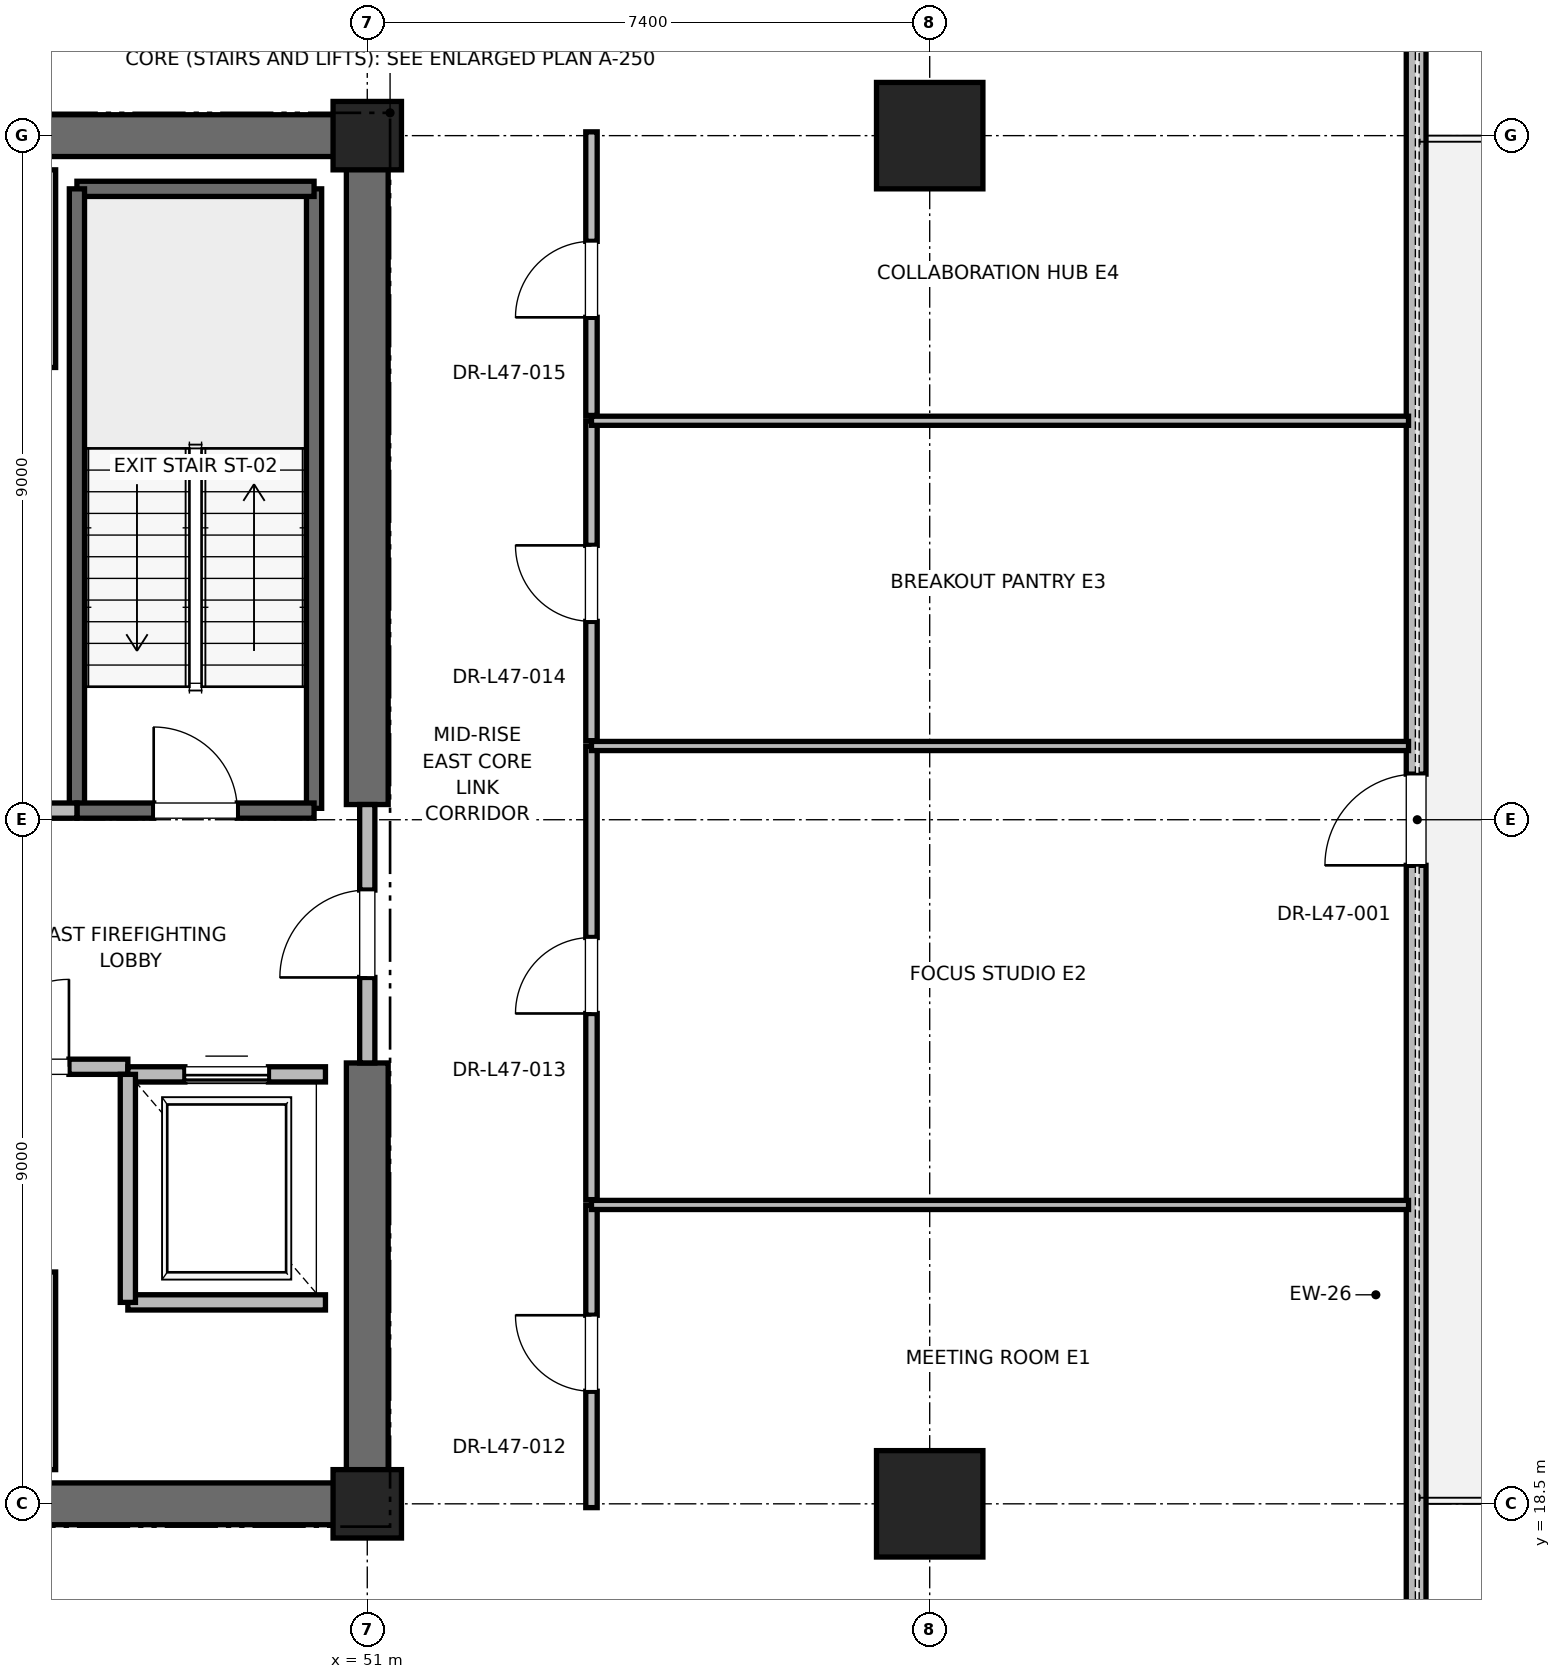
"""IFC4 building model, lengths in metres.
Left out: names, types, materials, properties, quantities, classifications, styles, units other than length and angle.
Written with IfcOpenShell. Run it as: python <this file> out.ifc"""

import sys

from ifc_helpers import new_model, si_unit, direction, frame, frame_2d, origin, origin_2d, place, context, subcontext, project, spatial, rectangle, extrude, element, fill, save


model = new_model("IFC4")
c1 = context("Model", 3, precision=1e-05, world=origin(), true_north=direction((0.0, 1.0)))
c2 = subcontext(c1, "Body", "Model", "MODEL_VIEW")
j1 = project(units=[si_unit("LENGTHUNIT", "METRE"), si_unit("PLANEANGLEUNIT", "RADIAN")], contexts=[c1])
p1 = place(None, origin())
s1 = spatial("IfcSite", under=j1, at=p1, CompositionType="ELEMENT")
p2 = place(p1, origin())
s2 = spatial("IfcBuilding", under=s1, at=p2, CompositionType="ELEMENT")
p3 = place(p2, frame((0.0, 0.0, 205.2)))
s3 = spatial("IfcBuildingStorey", under=s2, at=p3, CompositionType="ELEMENT", Elevation=205.2)
for number, where, z_axis, x_axis in (
    (1, (58.4, 18.5, 0.0), (0.0, 0.0, 1.0), (1.0, 0.0, 0.0)),
    (2, (58.4, 36.5, 0.0), (0.0, 0.0, 1.0), (1.0, 0.0, 0.0)),
):
    element("IfcColumn", number, at=place(p3, frame(where, z_axis=z_axis, x_axis=x_axis)), inside=s3, PredefinedType="COLUMN", context=c2, shape_type="SweptSolid", body=[
        extrude(rectangle(XDim=1.4, YDim=1.4, at=origin_2d()), origin(), (0.0, 0.0, 1.0), 4.0),
    ])
for number, where, z_axis, x_axis in (
    (3, (51.0, 18.5, 0.0), (0.0, 0.0, 1.0), (1.0, 0.0, 0.0)),
    (4, (51.0, 36.5, 0.0), (0.0, 0.0, 1.0), (1.0, 0.0, 0.0)),
):
    element("IfcColumn", number, at=place(p3, frame(where, z_axis=z_axis, x_axis=x_axis)), inside=s3, PredefinedType="PILASTER", context=c2, shape_type="SweptSolid", body=[
        extrude(rectangle(XDim=0.9, YDim=0.9, at=origin_2d()), origin(), (0.0, 0.0, 1.0), 4.0),
    ])
p4 = place(p3, frame((41.8, 18.5, 0.0), z_axis=(0.0, 0.0, 1.0), x_axis=(1.0, 0.0, 0.0)))
e5 = element("IfcWall", 5, at=p4, inside=s3, PredefinedType="SHEAR", context=c2, shape_type="SweptSolid", body=[
    extrude(rectangle(XDim=9.2, YDim=0.55, at=frame_2d((4.6, 0.0))), origin(), (0.0, 0.0, 1.0), 3.775),
])
for number, where, z_axis, x_axis in (
    (6, (45.2, 36.5, 0.0), (0.0, 0.0, 1.0), (1.0, 0.0, 0.0)),
    (7, (51.0, 18.5, 0.0), (0.0, 0.0, 1.0), (0.0, 1.0, 0.0)),
):
    element("IfcWall", number, at=place(p3, frame(where, z_axis=z_axis, x_axis=x_axis)), inside=s3, PredefinedType="SHEAR", context=c2, shape_type="SweptSolid", body=[
        extrude(rectangle(XDim=5.8, YDim=0.55, at=frame_2d((2.9, 0.0))), origin(), (0.0, 0.0, 1.0), 3.775),
    ])
p5 = place(p3, frame((51.0, 27.7, 0.0), z_axis=(0.0, 0.0, 1.0), x_axis=(0.0, 1.0, 0.0)))
e8 = element("IfcWall", 8, at=p5, inside=s3, PredefinedType="SHEAR", context=c2, shape_type="SweptSolid", body=[
    extrude(rectangle(XDim=8.8, YDim=0.55, at=frame_2d((4.4, 0.0))), origin(), (0.0, 0.0, 1.0), 3.775),
])
p6 = place(p3, frame((64.8, 9.4, 0.0), z_axis=(0.0, 0.0, 1.0), x_axis=(0.0, 1.0, 0.0)))
e9 = element("IfcWall", 9, at=p6, inside=s3, PredefinedType="PARAPET", context=c2, shape_type="SweptSolid", body=[
    extrude(rectangle(XDim=36.2, YDim=0.26, at=frame_2d((18.1, 0.0))), origin(), (0.0, 0.0, 1.0), 3.047),
])
p7 = place(p6, frame((4.2, 0.0, 0.85)))
e10 = element("IfcOpeningElement", 10, at=p7, cuts=e9, PredefinedType="OPENING", context=c2, shape_type="SweptSolid", body=[
    extrude(rectangle(XDim=2.0, YDim=2.3, at=frame_2d((1.0, 1.15))), frame((0.0, 0.13, 0.0), z_axis=(0.0, -1.0, 0.0), x_axis=(1.0, 0.0, 0.0)), (0.0, 0.0, 1.0), 0.26),
])
p8 = place(p6, frame((17.5, 0.0, 0.0)))
e11 = element("IfcOpeningElement", 11, at=p8, cuts=e9, PredefinedType="OPENING", context=c2, shape_type="SweptSolid", body=[
    extrude(rectangle(XDim=1.2, YDim=2.2, at=frame_2d((0.6, 1.1))), frame((0.0, 0.13, 0.0), z_axis=(0.0, -1.0, 0.0), x_axis=(1.0, 0.0, 0.0)), (0.0, 0.0, 1.0), 0.26),
])
p9 = place(p6, frame((30.0, 0.0, 0.85)))
e12 = element("IfcOpeningElement", 12, at=p9, cuts=e9, PredefinedType="OPENING", context=c2, shape_type="SweptSolid", body=[
    extrude(rectangle(XDim=2.0, YDim=2.3, at=frame_2d((1.0, 1.15))), frame((0.0, 0.13, 0.0), z_axis=(0.0, -1.0, 0.0), x_axis=(1.0, 0.0, 0.0)), (0.0, 0.0, 1.0), 0.26),
])
p10 = place(p3, frame((50.3, 27.65, 0.0), z_axis=(0.0, 0.0, 1.0), x_axis=(0.0, 1.0, 0.0)))
e13 = element("IfcWall", 13, at=p10, inside=s3, PredefinedType="SOLIDWALL", context=c2, shape_type="SweptSolid", body=[
    extrude(rectangle(XDim=8.15, YDim=0.2, at=frame_2d((4.075, 0.0))), origin(), (0.0, 0.0, 1.0), 3.775),
])
p11 = place(p3, frame((47.18, 35.8, 0.0), z_axis=(0.0, 0.0, 1.0), x_axis=(1.0, 0.0, 0.0)))
e14 = element("IfcWall", 14, at=p11, inside=s3, PredefinedType="SOLIDWALL", context=c2, shape_type="SweptSolid", body=[
    extrude(rectangle(XDim=3.12, YDim=0.2, at=frame_2d((1.56, 0.0))), origin(), (0.0, 0.0, 1.0), 3.775),
])
p12 = place(p3, frame((47.18, 27.62, 0.0), z_axis=(0.0, 0.0, 1.0), x_axis=(0.0, 1.0, 0.0)))
e15 = element("IfcWall", 15, at=p12, inside=s3, PredefinedType="SOLIDWALL", context=c2, shape_type="SweptSolid", body=[
    extrude(rectangle(XDim=8.18, YDim=0.2, at=frame_2d((4.09, 0.0))), origin(), (0.0, 0.0, 1.0), 3.775),
])
p13 = place(p3, frame((47.18, 27.62, 0.0), z_axis=(0.0, 0.0, 1.0), x_axis=(1.0, 0.0, 0.0)))
e16 = element("IfcWall", 16, at=p13, inside=s3, PredefinedType="SOLIDWALL", context=c2, shape_type="SweptSolid", body=[
    extrude(rectangle(XDim=3.12, YDim=0.2, at=frame_2d((1.56, 0.0))), origin(), (0.0, 0.0, 1.0), 3.775),
])
p14 = place(p13, frame((1.01, 0.0, 0.0)))
e17 = element("IfcOpeningElement", 17, at=p14, cuts=e16, PredefinedType="OPENING", context=c2, shape_type="SweptSolid", body=[
    extrude(rectangle(XDim=1.1, YDim=2.15, at=frame_2d((0.55, 1.075))), frame((0.0, 0.1, 0.0), z_axis=(0.0, -1.0, 0.0), x_axis=(1.0, 0.0, 0.0)), (0.0, 0.0, 1.0), 0.2),
])
p15 = place(p3, frame((45.15, 24.25, 0.0), z_axis=(0.0, 0.0, 1.0), x_axis=(1.0, 0.0, 0.0)))
e18 = element("IfcWall", 18, at=p15, inside=s3, PredefinedType="PARTITIONING", context=c2, shape_type="SweptSolid", body=[
    extrude(rectangle(XDim=2.7, YDim=0.2, at=frame_2d((1.35, 0.0))), origin(), (0.0, 0.0, 1.0), 3.775),
])
p16 = place(p15, frame((0.775, 0.0, 0.0)))
e19 = element("IfcOpeningElement", 19, at=p16, cuts=e18, PredefinedType="OPENING", context=c2, shape_type="SweptSolid", body=[
    extrude(rectangle(XDim=1.15, YDim=2.2, at=frame_2d((0.575, 1.1))), frame((0.0, 0.1, 0.0), z_axis=(0.0, -1.0, 0.0), x_axis=(1.0, 0.0, 0.0)), (0.0, 0.0, 1.0), 0.2),
])
p17 = place(p3, frame((45.15, 27.62, 0.0), z_axis=(0.0, 0.0, 1.0), x_axis=(1.0, 0.0, 0.0)))
e20 = element("IfcWall", 20, at=p17, inside=s3, PredefinedType="PARTITIONING", context=c2, shape_type="SweptSolid", body=[
    extrude(rectangle(XDim=2.03, YDim=0.2, at=frame_2d((1.015, 0.0))), origin(), (0.0, 0.0, 1.0), 3.775),
])
p18 = place(p17, frame((0.44, 0.0, 0.0)))
e21 = element("IfcOpeningElement", 21, at=p18, cuts=e20, PredefinedType="OPENING", context=c2, shape_type="SweptSolid", body=[
    extrude(rectangle(XDim=1.15, YDim=2.2, at=frame_2d((0.575, 1.1))), frame((0.0, 0.1, 0.0), z_axis=(0.0, -1.0, 0.0), x_axis=(1.0, 0.0, 0.0)), (0.0, 0.0, 1.0), 0.2),
])
p19 = place(p3, frame((51.0, 24.3, 0.0), z_axis=(0.0, 0.0, 1.0), x_axis=(0.0, 1.0, 0.0)))
e22 = element("IfcWall", 22, at=p19, inside=s3, PredefinedType="PARTITIONING", context=c2, shape_type="SweptSolid", body=[
    extrude(rectangle(XDim=3.4, YDim=0.2, at=frame_2d((1.7, 0.0))), origin(), (0.0, 0.0, 1.0), 2.755),
])
p20 = place(p19, frame((1.125, 0.0, 0.0)))
e23 = element("IfcOpeningElement", 23, at=p20, cuts=e22, PredefinedType="OPENING", context=c2, shape_type="SweptSolid", body=[
    extrude(rectangle(XDim=1.15, YDim=2.2, at=frame_2d((0.575, 1.1))), frame((0.0, 0.1, 0.0), z_axis=(0.0, -1.0, 0.0), x_axis=(1.0, 0.0, 0.0)), (0.0, 0.0, 1.0), 0.2),
])
p21 = place(p3, frame((47.85, 21.15, 0.0), z_axis=(0.0, 0.0, 1.0), x_axis=(1.0, 0.0, 0.0)))
e24 = element("IfcWall", 24, at=p21, inside=s3, PredefinedType="SOLIDWALL", context=c2, shape_type="SweptSolid", body=[
    extrude(rectangle(XDim=2.6, YDim=0.2, at=frame_2d((1.3, 0.0))), origin(), (0.0, 0.0, 1.0), 3.775),
])
p22 = place(p3, frame((50.45, 24.15, 0.0), z_axis=(0.0, 0.0, 1.0), x_axis=(-1.0, 0.0, 0.0)))
e25 = element("IfcWall", 25, at=p22, inside=s3, PredefinedType="SOLIDWALL", context=c2, shape_type="SweptSolid", body=[
    extrude(rectangle(XDim=2.6, YDim=0.2, at=frame_2d((1.3, 0.0))), origin(), (0.0, 0.0, 1.0), 2.755),
])
p23 = place(p22, frame((0.75, 0.0, 0.0)))
e26 = element("IfcOpeningElement", 26, at=p23, cuts=e25, PredefinedType="OPENING", context=c2, shape_type="SweptSolid", body=[
    extrude(rectangle(XDim=1.1, YDim=2.2, at=frame_2d((0.55, 1.1))), frame((0.0, 0.1, 0.0), z_axis=(0.0, -1.0, 0.0), x_axis=(1.0, 0.0, 0.0)), (0.0, 0.0, 1.0), 0.2),
])
p24 = place(p3, frame((47.85, 24.15, 0.0), z_axis=(0.0, 0.0, 1.0), x_axis=(0.0, -1.0, 0.0)))
e27 = element("IfcWall", 27, at=p24, inside=s3, PredefinedType="SOLIDWALL", context=c2, shape_type="SweptSolid", body=[
    extrude(rectangle(XDim=3.0, YDim=0.2, at=frame_2d((1.5, 0.0))), origin(), (0.0, 0.0, 1.0), 3.775),
])
for number, where, z_axis, x_axis in (
    (28, (46.8, 18.95, 0.0), (0.0, 0.0, 1.0), (0.0, 1.0, 0.0)),
    (29, (46.8, 33.45, 0.0), (0.0, 0.0, 1.0), (0.0, 1.0, 0.0)),
):
    element("IfcWall", number, at=place(p3, frame(where, z_axis=z_axis, x_axis=x_axis)), inside=s3, PredefinedType="SOLIDWALL", context=c2, shape_type="SweptSolid", body=[
        extrude(rectangle(XDim=2.6, YDim=0.2, at=frame_2d((1.3, 0.0))), origin(), (0.0, 0.0, 1.0), 3.775),
    ])
p25 = place(p3, frame((53.95, 18.45, 0.0), z_axis=(0.0, 0.0, 1.0), x_axis=(0.0, 1.0, 0.0)))
e30 = element("IfcWall", 30, at=p25, inside=s3, PredefinedType="PARTITIONING", context=c2, shape_type="SweptSolid", body=[
    extrude(rectangle(XDim=3.982, YDim=0.15, at=frame_2d((1.991, 0.0))), origin(), (0.0, 0.0, 1.0), 2.85),
])
p26 = place(p25, frame((1.531, 0.0, 0.0)))
e31 = element("IfcOpeningElement", 31, at=p26, cuts=e30, PredefinedType="OPENING", context=c2, shape_type="SweptSolid", body=[
    extrude(rectangle(XDim=1.0, YDim=2.15, at=frame_2d((0.5, 1.075))), frame((0.0, 0.075, 0.0), z_axis=(0.0, -1.0, 0.0), x_axis=(1.0, 0.0, 0.0)), (0.0, 0.0, 1.0), 0.15),
])
p27 = place(p3, frame((53.95, 22.432, 0.0), z_axis=(0.0, 0.0, 1.0), x_axis=(1.0, 0.0, 0.0)))
e32 = element("IfcWall", 32, at=p27, inside=s3, PredefinedType="PARTITIONING", context=c2, shape_type="SweptSolid", body=[
    extrude(rectangle(XDim=10.75, YDim=0.12, at=frame_2d((5.375, 0.0))), origin(), (0.0, 0.0, 1.0), 2.85),
])
p28 = place(p3, frame((53.95, 22.502, 0.0), z_axis=(0.0, 0.0, 1.0), x_axis=(0.0, 1.0, 0.0)))
e33 = element("IfcWall", 33, at=p28, inside=s3, PredefinedType="PARTITIONING", context=c2, shape_type="SweptSolid", body=[
    extrude(rectangle(XDim=5.968, YDim=0.15, at=frame_2d((2.984, 0.0))), origin(), (0.0, 0.0, 1.0), 2.85),
])
p29 = place(p28, frame((2.449, 0.0, 0.0)))
e34 = element("IfcOpeningElement", 34, at=p29, cuts=e33, PredefinedType="OPENING", context=c2, shape_type="SweptSolid", body=[
    extrude(rectangle(XDim=1.0, YDim=2.15, at=frame_2d((0.5, 1.075))), frame((0.0, 0.075, 0.0), z_axis=(0.0, -1.0, 0.0), x_axis=(1.0, 0.0, 0.0)), (0.0, 0.0, 1.0), 0.15),
])
p30 = place(p3, frame((53.95, 28.47, 0.0), z_axis=(0.0, 0.0, 1.0), x_axis=(1.0, 0.0, 0.0)))
e35 = element("IfcWall", 35, at=p30, inside=s3, PredefinedType="PARTITIONING", context=c2, shape_type="SweptSolid", body=[
    extrude(rectangle(XDim=10.75, YDim=0.12, at=frame_2d((5.375, 0.0))), origin(), (0.0, 0.0, 1.0), 2.85),
])
p31 = place(p3, frame((53.95, 28.54, 0.0), z_axis=(0.0, 0.0, 1.0), x_axis=(0.0, 1.0, 0.0)))
e36 = element("IfcWall", 36, at=p31, inside=s3, PredefinedType="PARTITIONING", context=c2, shape_type="SweptSolid", body=[
    extrude(rectangle(XDim=4.209, YDim=0.15, at=frame_2d((2.104, 0.0))), origin(), (0.0, 0.0, 1.0), 2.85),
])
p32 = place(p31, frame((1.57, 0.0, 0.0)))
e37 = element("IfcOpeningElement", 37, at=p32, cuts=e36, PredefinedType="OPENING", context=c2, shape_type="SweptSolid", body=[
    extrude(rectangle(XDim=1.0, YDim=2.15, at=frame_2d((0.5, 1.075))), frame((0.0, 0.075, 0.0), z_axis=(0.0, -1.0, 0.0), x_axis=(1.0, 0.0, 0.0)), (0.0, 0.0, 1.0), 0.15),
])
p33 = place(p3, frame((53.95, 32.749, 0.0), z_axis=(0.0, 0.0, 1.0), x_axis=(1.0, 0.0, 0.0)))
e38 = element("IfcWall", 38, at=p33, inside=s3, PredefinedType="PARTITIONING", context=c2, shape_type="SweptSolid", body=[
    extrude(rectangle(XDim=10.75, YDim=0.12, at=frame_2d((5.375, 0.0))), origin(), (0.0, 0.0, 1.0), 2.85),
])
p34 = place(p3, frame((53.95, 32.819, 0.0), z_axis=(0.0, 0.0, 1.0), x_axis=(0.0, 1.0, 0.0)))
e39 = element("IfcWall", 39, at=p34, inside=s3, PredefinedType="PARTITIONING", context=c2, shape_type="SweptSolid", body=[
    extrude(rectangle(XDim=3.731, YDim=0.15, at=frame_2d((1.865, 0.0))), origin(), (0.0, 0.0, 1.0), 2.85),
])
p35 = place(p34, frame((1.291, 0.0, 0.0)))
e40 = element("IfcOpeningElement", 40, at=p35, cuts=e39, PredefinedType="OPENING", context=c2, shape_type="SweptSolid", body=[
    extrude(rectangle(XDim=1.0, YDim=2.15, at=frame_2d((0.5, 1.075))), frame((0.0, 0.075, 0.0), z_axis=(0.0, -1.0, 0.0), x_axis=(1.0, 0.0, 0.0)), (0.0, 0.0, 1.0), 0.15),
])
p36 = place(p8, origin())
e41 = element("IfcDoor", 41, at=p36, inside=s3, OperationType="SINGLE_SWING_LEFT", PredefinedType="DOOR", context=c2, shape_type="SweptSolid", body=[
    extrude(rectangle(XDim=1.2, YDim=2.2, at=frame_2d((0.6, 1.1))), frame((0.0, 0.025, 0.0), z_axis=(0.0, -1.0, 0.0), x_axis=(1.0, 0.0, 0.0)), (0.0, 0.0, 1.0), 0.05),
])
fill(e11, e41)
p37 = place(p14, origin())
e42 = element("IfcDoor", 42, at=p37, inside=s3, OperationType="SINGLE_SWING_LEFT", PredefinedType="DOOR", context=c2, shape_type="SweptSolid", body=[
    extrude(rectangle(XDim=1.1, YDim=2.15, at=frame_2d((0.55, 1.075))), frame((0.0, 0.025, 0.0), z_axis=(0.0, -1.0, 0.0), x_axis=(1.0, 0.0, 0.0)), (0.0, 0.0, 1.0), 0.05),
])
fill(e17, e42)
p38 = place(p16, origin())
e43 = element("IfcDoor", 43, at=p38, inside=s3, OperationType="SINGLE_SWING_RIGHT", PredefinedType="DOOR", context=c2, shape_type="SweptSolid", body=[
    extrude(rectangle(XDim=1.15, YDim=2.2, at=frame_2d((0.575, 1.1))), frame((0.0, 0.025, 0.0), z_axis=(0.0, -1.0, 0.0), x_axis=(1.0, 0.0, 0.0)), (0.0, 0.0, 1.0), 0.05),
])
fill(e19, e43)
p39 = place(p20, origin())
e44 = element("IfcDoor", 44, at=p39, inside=s3, OperationType="SINGLE_SWING_LEFT", PredefinedType="DOOR", context=c2, shape_type="SweptSolid", body=[
    extrude(rectangle(XDim=1.15, YDim=2.2, at=frame_2d((0.575, 1.1))), frame((0.0, 0.025, 0.0), z_axis=(0.0, -1.0, 0.0), x_axis=(1.0, 0.0, 0.0)), (0.0, 0.0, 1.0), 0.05),
])
fill(e23, e44)
p40 = place(p23, origin())
e45 = element("IfcDoor", 45, at=p40, inside=s3, OperationType="SLIDING_TO_RIGHT", PredefinedType="DOOR", context=c2, shape_type="SweptSolid", body=[
    extrude(rectangle(XDim=1.1, YDim=2.2, at=frame_2d((0.55, 1.1))), frame((0.0, 0.025, 0.0), z_axis=(0.0, -1.0, 0.0), x_axis=(1.0, 0.0, 0.0)), (0.0, 0.0, 1.0), 0.05),
])
fill(e26, e45)
p41 = place(p26, origin())
e46 = element("IfcDoor", 46, at=p41, inside=s3, OperationType="SINGLE_SWING_RIGHT", PredefinedType="DOOR", context=c2, shape_type="SweptSolid", body=[
    extrude(rectangle(XDim=1.0, YDim=2.15, at=frame_2d((0.5, 1.075))), frame((0.0, 0.025, 0.0), z_axis=(0.0, -1.0, 0.0), x_axis=(1.0, 0.0, 0.0)), (0.0, 0.0, 1.0), 0.05),
])
fill(e31, e46)
p42 = place(p29, origin())
e47 = element("IfcDoor", 47, at=p42, inside=s3, OperationType="SINGLE_SWING_LEFT", PredefinedType="DOOR", context=c2, shape_type="SweptSolid", body=[
    extrude(rectangle(XDim=1.0, YDim=2.15, at=frame_2d((0.5, 1.075))), frame((0.0, 0.025, 0.0), z_axis=(0.0, -1.0, 0.0), x_axis=(1.0, 0.0, 0.0)), (0.0, 0.0, 1.0), 0.05),
])
fill(e34, e47)
p43 = place(p32, origin())
e48 = element("IfcDoor", 48, at=p43, inside=s3, OperationType="SINGLE_SWING_RIGHT", PredefinedType="DOOR", context=c2, shape_type="SweptSolid", body=[
    extrude(rectangle(XDim=1.0, YDim=2.15, at=frame_2d((0.5, 1.075))), frame((0.0, 0.025, 0.0), z_axis=(0.0, -1.0, 0.0), x_axis=(1.0, 0.0, 0.0)), (0.0, 0.0, 1.0), 0.05),
])
fill(e37, e48)
p44 = place(p35, origin())
e49 = element("IfcDoor", 49, at=p44, inside=s3, OperationType="SINGLE_SWING_LEFT", PredefinedType="DOOR", context=c2, shape_type="SweptSolid", body=[
    extrude(rectangle(XDim=1.0, YDim=2.15, at=frame_2d((0.5, 1.075))), frame((0.0, 0.025, 0.0), z_axis=(0.0, -1.0, 0.0), x_axis=(1.0, 0.0, 0.0)), (0.0, 0.0, 1.0), 0.05),
])
fill(e40, e49)
save(model, sys.argv[1])
